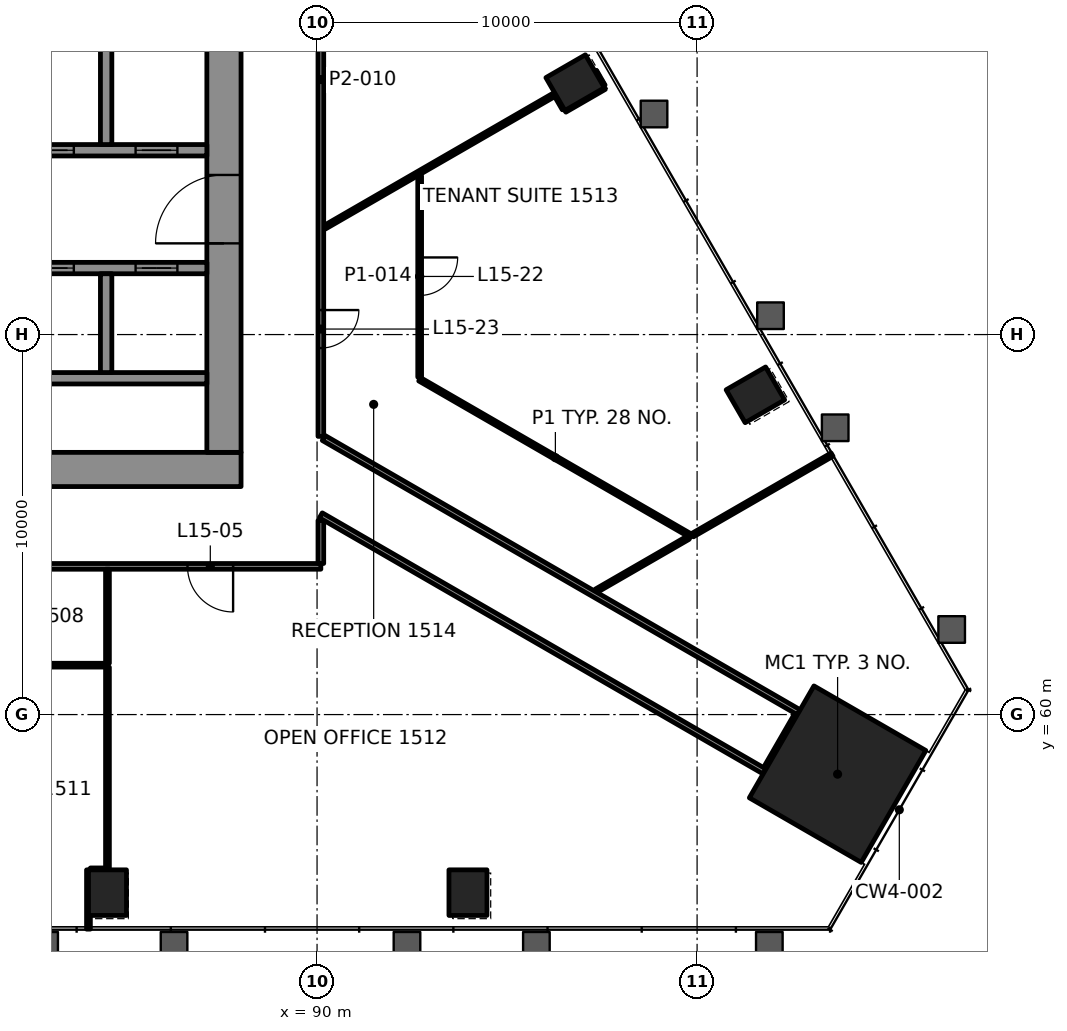
"""IFC4 building model, lengths in metres.
Left out: names, types, materials, properties, quantities, classifications, styles, units other than length and angle.
Written with IfcOpenShell. Run it as: python <this file> out.ifc"""

import sys

from ifc_helpers import new_model, si_unit, direction, frame, frame_2d, origin, origin_2d, place, context, subcontext, project, spatial, rectangle, extrude, element, fill, save


model = new_model("IFC4")
c1 = context("Model", 3, precision=1e-05, world=origin(), true_north=direction((0.0, 1.0)))
c2 = subcontext(c1, "Body", "Model", "MODEL_VIEW")
j1 = project(units=[si_unit("LENGTHUNIT", "METRE"), si_unit("PLANEANGLEUNIT", "RADIAN")], contexts=[c1])
p1 = place(None, origin())
s1 = spatial("IfcSite", under=j1, at=p1, CompositionType="ELEMENT")
p2 = place(p1, origin())
s2 = spatial("IfcBuilding", under=s1, at=p2, CompositionType="ELEMENT")
p3 = place(p2, frame((0.0, 0.0, 69.4)))
s3 = spatial("IfcBuildingStorey", under=s2, at=p3, CompositionType="ELEMENT", Elevation=69.4)
p4 = place(p3, frame((103.697, 58.432, 0.0), z_axis=(0.0, 0.0, 1.0), x_axis=(0.5, 0.866025403784, 0.0)))
e1 = element("IfcColumn", 1, at=p4, inside=s3, PredefinedType="COLUMN", context=c2, shape_type="SweptSolid", body=[
    extrude(rectangle(XDim=3.4, YDim=3.4, at=origin_2d()), origin(), (0.0, 0.0, 1.0), 4.2),
])
for number, where, z_axis, x_axis in (
    (2, (84.485, 55.314, -0.0), (0.0, 0.0, 1.0), (1.0, 0.0, 0.0)),
    (3, (93.971, 55.314, -0.0), (0.0, 0.0, 1.0), (1.0, 0.0, 0.0)),
    (4, (101.534, 68.414, -0.0), (0.0, 0.0, 1.0), (-0.5, 0.866, 0.0)),
    (5, (96.791, 76.628, -0.0), (0.0, 0.0, 1.0), (-0.5, 0.866, 0.0)),
):
    element("IfcColumn", number, at=place(p3, frame(where, z_axis=z_axis, x_axis=x_axis)), inside=s3, PredefinedType="COLUMN", context=c2, shape_type="SweptSolid", body=[
        extrude(rectangle(XDim=1.0, YDim=1.2, at=origin_2d()), origin(), (0.0, 0.0, 1.0), 4.2),
    ])
p5 = place(p3, frame((62.0, 66.45, 0.0), z_axis=(0.0, 0.0, 1.0), x_axis=(1.0, 0.0, 0.0)))
e6 = element("IfcWall", 6, at=p5, inside=s3, PredefinedType="SHEAR", context=c2, shape_type="SweptSolid", body=[
    extrude(rectangle(XDim=26.0, YDim=0.9, at=frame_2d((13.0, 0.0))), origin(), (0.0, 0.0, 1.0), 4.0),
])
p6 = place(p5, frame((3.45, 0.0, 0.0)))
e7 = element("IfcOpeningElement", 7, at=p6, cuts=e6, PredefinedType="OPENING", context=c2, shape_type="SweptSolid", body=[
    extrude(rectangle(XDim=0.9, YDim=2.1, at=frame_2d((0.45, 1.05))), frame((0.0, 0.46, 0.0), z_axis=(0.0, -1.0, 0.0), x_axis=(1.0, 0.0, 0.0)), (0.0, 0.0, 1.0), 0.92),
])
p7 = place(p5, frame((5.637, 0.0, 0.0)))
e8 = element("IfcOpeningElement", 8, at=p7, cuts=e6, PredefinedType="OPENING", context=c2, shape_type="SweptSolid", body=[
    extrude(rectangle(XDim=0.9, YDim=2.1, at=frame_2d((0.45, 1.05))), frame((0.0, 0.46, 0.0), z_axis=(0.0, -1.0, 0.0), x_axis=(1.0, 0.0, 0.0)), (0.0, 0.0, 1.0), 0.92),
])
p8 = place(p5, frame((7.212, 0.0, 0.0)))
e9 = element("IfcOpeningElement", 9, at=p8, cuts=e6, PredefinedType="OPENING", context=c2, shape_type="SweptSolid", body=[
    extrude(rectangle(XDim=0.9, YDim=2.1, at=frame_2d((0.45, 1.05))), frame((0.0, 0.46, 0.0), z_axis=(0.0, -1.0, 0.0), x_axis=(1.0, 0.0, 0.0)), (0.0, 0.0, 1.0), 0.92),
])
p9 = place(p5, frame((8.999, 0.0, 0.0)))
e10 = element("IfcOpeningElement", 10, at=p9, cuts=e6, PredefinedType="OPENING", context=c2, shape_type="SweptSolid", body=[
    extrude(rectangle(XDim=0.9, YDim=2.1, at=frame_2d((0.45, 1.05))), frame((0.0, 0.46, 0.0), z_axis=(0.0, -1.0, 0.0), x_axis=(1.0, 0.0, 0.0)), (0.0, 0.0, 1.0), 0.92),
])
p10 = place(p5, frame((17.324, 0.0, 0.0)))
e11 = element("IfcOpeningElement", 11, at=p10, cuts=e6, PredefinedType="OPENING", context=c2, shape_type="SweptSolid", body=[
    extrude(rectangle(XDim=0.9, YDim=2.1, at=frame_2d((0.45, 1.05))), frame((0.0, 0.46, 0.0), z_axis=(0.0, -1.0, 0.0), x_axis=(1.0, 0.0, 0.0)), (0.0, 0.0, 1.0), 0.92),
])
p11 = place(p3, frame((87.55, 66.9, 0.0), z_axis=(0.0, 0.0, 1.0), x_axis=(0.0, 1.0, 0.0)))
e12 = element("IfcWall", 12, at=p11, inside=s3, PredefinedType="SHEAR", context=c2, shape_type="SweptSolid", body=[
    extrude(rectangle(XDim=16.2, YDim=0.9, at=frame_2d((8.1, 0.0))), origin(), (0.0, 0.0, 1.0), 4.0),
])
p12 = place(p11, frame((5.5, 0.0, 0.0)))
e13 = element("IfcOpeningElement", 13, at=p12, cuts=e12, PredefinedType="OPENING", context=c2, shape_type="SweptSolid", body=[
    extrude(rectangle(XDim=1.8, YDim=2.1, at=frame_2d((0.9, 1.05))), frame((0.0, 0.46, 0.0), z_axis=(0.0, -1.0, 0.0), x_axis=(1.0, 0.0, 0.0)), (0.0, 0.0, 1.0), 0.92),
])
p13 = place(p11, frame((11.202, 0.0, 0.0)))
e14 = element("IfcOpeningElement", 14, at=p13, cuts=e12, PredefinedType="OPENING", context=c2, shape_type="SweptSolid", body=[
    extrude(rectangle(XDim=0.9, YDim=2.1, at=frame_2d((0.45, 1.05))), frame((0.0, 0.46, 0.0), z_axis=(0.0, -1.0, 0.0), x_axis=(1.0, 0.0, 0.0)), (0.0, 0.0, 1.0), 0.92),
])
p14 = place(p3, frame((70.35, 68.85, 0.0), z_axis=(0.0, 0.0, 1.0), x_axis=(1.0, 0.0, 0.0)))
e15 = element("IfcWall", 15, at=p14, inside=s3, PredefinedType="SHEAR", context=c2, shape_type="SweptSolid", body=[
    extrude(rectangle(XDim=16.75, YDim=0.3, at=frame_2d((8.375, 0.0))), origin(), (0.0, 0.0, 1.0), 4.0),
])
p15 = place(p3, frame((70.3, 71.75, 0.0), z_axis=(0.0, 0.0, 1.0), x_axis=(1.0, 0.0, 0.0)))
e16 = element("IfcWall", 16, at=p15, inside=s3, PredefinedType="SHEAR", context=c2, shape_type="SweptSolid", body=[
    extrude(rectangle(XDim=16.8, YDim=0.3, at=frame_2d((8.4, 0.0))), origin(), (0.0, 0.0, 1.0), 4.0),
])
p16 = place(p15, frame((1.0, 0.0, 0.0)))
e17 = element("IfcOpeningElement", 17, at=p16, cuts=e16, PredefinedType="OPENING", context=c2, shape_type="SweptSolid", body=[
    extrude(rectangle(XDim=1.1, YDim=2.1, at=frame_2d((0.55, 1.05))), frame((0.0, 0.16, 0.0), z_axis=(0.0, -1.0, 0.0), x_axis=(1.0, 0.0, 0.0)), (0.0, 0.0, 1.0), 0.32),
])
p17 = place(p15, frame((3.8, 0.0, 0.0)))
e18 = element("IfcOpeningElement", 18, at=p17, cuts=e16, PredefinedType="OPENING", context=c2, shape_type="SweptSolid", body=[
    extrude(rectangle(XDim=1.1, YDim=2.1, at=frame_2d((0.55, 1.05))), frame((0.0, 0.16, 0.0), z_axis=(0.0, -1.0, 0.0), x_axis=(1.0, 0.0, 0.0)), (0.0, 0.0, 1.0), 0.32),
])
p18 = place(p15, frame((6.6, 0.0, 0.0)))
e19 = element("IfcOpeningElement", 19, at=p18, cuts=e16, PredefinedType="OPENING", context=c2, shape_type="SweptSolid", body=[
    extrude(rectangle(XDim=1.1, YDim=2.1, at=frame_2d((0.55, 1.05))), frame((0.0, 0.16, 0.0), z_axis=(0.0, -1.0, 0.0), x_axis=(1.0, 0.0, 0.0)), (0.0, 0.0, 1.0), 0.32),
])
p19 = place(p15, frame((9.4, 0.0, 0.0)))
e20 = element("IfcOpeningElement", 20, at=p19, cuts=e16, PredefinedType="OPENING", context=c2, shape_type="SweptSolid", body=[
    extrude(rectangle(XDim=1.1, YDim=2.1, at=frame_2d((0.55, 1.05))), frame((0.0, 0.16, 0.0), z_axis=(0.0, -1.0, 0.0), x_axis=(1.0, 0.0, 0.0)), (0.0, 0.0, 1.0), 0.32),
])
p20 = place(p15, frame((12.2, 0.0, 0.0)))
e21 = element("IfcOpeningElement", 21, at=p20, cuts=e16, PredefinedType="OPENING", context=c2, shape_type="SweptSolid", body=[
    extrude(rectangle(XDim=1.1, YDim=2.1, at=frame_2d((0.55, 1.05))), frame((0.0, 0.16, 0.0), z_axis=(0.0, -1.0, 0.0), x_axis=(1.0, 0.0, 0.0)), (0.0, 0.0, 1.0), 0.32),
])
p21 = place(p15, frame((14.925, 0.0, 0.0)))
e22 = element("IfcOpeningElement", 22, at=p21, cuts=e16, PredefinedType="OPENING", context=c2, shape_type="SweptSolid", body=[
    extrude(rectangle(XDim=1.1, YDim=2.1, at=frame_2d((0.55, 1.05))), frame((0.0, 0.16, 0.0), z_axis=(0.0, -1.0, 0.0), x_axis=(1.0, 0.0, 0.0)), (0.0, 0.0, 1.0), 0.32),
])
p22 = place(p3, frame((70.3, 74.85, 0.0), z_axis=(0.0, 0.0, 1.0), x_axis=(1.0, 0.0, 0.0)))
e23 = element("IfcWall", 23, at=p22, inside=s3, PredefinedType="SHEAR", context=c2, shape_type="SweptSolid", body=[
    extrude(rectangle(XDim=16.8, YDim=0.3, at=frame_2d((8.4, 0.0))), origin(), (0.0, 0.0, 1.0), 4.0),
])
p23 = place(p22, frame((3.8, 0.0, 0.0)))
e24 = element("IfcOpeningElement", 24, at=p23, cuts=e23, PredefinedType="OPENING", context=c2, shape_type="SweptSolid", body=[
    extrude(rectangle(XDim=1.1, YDim=2.1, at=frame_2d((0.55, 1.05))), frame((0.0, 0.16, 0.0), z_axis=(0.0, -1.0, 0.0), x_axis=(1.0, 0.0, 0.0)), (0.0, 0.0, 1.0), 0.32),
])
p24 = place(p22, frame((12.2, 0.0, 0.0)))
e25 = element("IfcOpeningElement", 25, at=p24, cuts=e23, PredefinedType="OPENING", context=c2, shape_type="SweptSolid", body=[
    extrude(rectangle(XDim=1.1, YDim=2.1, at=frame_2d((0.55, 1.05))), frame((0.0, 0.16, 0.0), z_axis=(0.0, -1.0, 0.0), x_axis=(1.0, 0.0, 0.0)), (0.0, 0.0, 1.0), 0.32),
])
p25 = place(p22, frame((14.925, 0.0, 0.0)))
e26 = element("IfcOpeningElement", 26, at=p25, cuts=e23, PredefinedType="OPENING", context=c2, shape_type="SweptSolid", body=[
    extrude(rectangle(XDim=1.1, YDim=2.1, at=frame_2d((0.55, 1.05))), frame((0.0, 0.16, 0.0), z_axis=(0.0, -1.0, 0.0), x_axis=(1.0, 0.0, 0.0)), (0.0, 0.0, 1.0), 0.32),
])
for number, where, z_axis, x_axis in (
    (27, (84.45, 69.0, 0.0), (0.0, 0.0, 1.0), (0.0, 1.0, 0.0)),
    (28, (84.45, 75.0, 0.0), (0.0, 0.0, 1.0), (0.0, 1.0, 0.0)),
):
    element("IfcWall", number, at=place(p3, frame(where, z_axis=z_axis, x_axis=x_axis)), inside=s3, PredefinedType="SHEAR", context=c2, shape_type="SweptSolid", body=[
        extrude(rectangle(XDim=2.6, YDim=0.3, at=frame_2d((1.3, 0.0))), origin(), (0.0, 0.0, 1.0), 4.0),
    ])
p26 = place(p3, frame((84.036, 55.914, 0.0), z_axis=(0.0, 0.0, 1.0), x_axis=(1.0, 0.0, 0.0)))
e29 = element("IfcWall", 29, at=p26, inside=s3, PredefinedType="PARTITIONING", context=c2, shape_type="SweptSolid", body=[
    extrude(rectangle(XDim=0.399, YDim=0.1, at=frame_2d((0.199, 0.0))), origin(), (0.0, 0.0, 1.0), 3.4),
])
p27 = place(p3, frame((58.271, 61.3, 0.0), z_axis=(0.0, 0.0, 1.0), x_axis=(1.0, 0.0, 0.0)))
e30 = element("IfcWall", 30, at=p27, inside=s3, PredefinedType="PARTITIONING", context=c2, shape_type="SweptSolid", body=[
    extrude(rectangle(XDim=26.214, YDim=0.1, at=frame_2d((13.107, 0.0))), origin(), (0.0, 0.0, 1.0), 3.4),
])
p28 = place(p27, frame((3.122, 0.0, 0.0)))
e31 = element("IfcOpeningElement", 31, at=p28, cuts=e30, PredefinedType="OPENING", context=c2, shape_type="SweptSolid", body=[
    extrude(rectangle(XDim=1.2, YDim=2.1, at=frame_2d((0.6, 1.05))), frame((0.0, 0.06, 0.0), z_axis=(0.0, -1.0, 0.0), x_axis=(1.0, 0.0, 0.0)), (0.0, 0.0, 1.0), 0.12),
])
p29 = place(p27, frame((9.957, 0.0, 0.0)))
e32 = element("IfcOpeningElement", 32, at=p29, cuts=e30, PredefinedType="OPENING", context=c2, shape_type="SweptSolid", body=[
    extrude(rectangle(XDim=0.9, YDim=2.1, at=frame_2d((0.45, 1.05))), frame((0.0, 0.06, 0.0), z_axis=(0.0, -1.0, 0.0), x_axis=(1.0, 0.0, 0.0)), (0.0, 0.0, 1.0), 0.12),
])
p30 = place(p27, frame((16.279, 0.0, 0.0)))
e33 = element("IfcOpeningElement", 33, at=p30, cuts=e30, PredefinedType="OPENING", context=c2, shape_type="SweptSolid", body=[
    extrude(rectangle(XDim=0.9, YDim=2.1, at=frame_2d((0.45, 1.05))), frame((0.0, 0.06, 0.0), z_axis=(0.0, -1.0, 0.0), x_axis=(1.0, 0.0, 0.0)), (0.0, 0.0, 1.0), 0.12),
])
p31 = place(p27, frame((22.501, 0.0, 0.0)))
e34 = element("IfcOpeningElement", 34, at=p31, cuts=e30, PredefinedType="OPENING", context=c2, shape_type="SweptSolid", body=[
    extrude(rectangle(XDim=0.9, YDim=2.1, at=frame_2d((0.45, 1.05))), frame((0.0, 0.06, 0.0), z_axis=(0.0, -1.0, 0.0), x_axis=(1.0, 0.0, 0.0)), (0.0, 0.0, 1.0), 0.12),
])
p32 = place(p3, frame((90.099, 63.9, 0.0), z_axis=(0.0, 0.0, 1.0), x_axis=(-1.0, 0.0, 0.0)))
e35 = element("IfcWall", 35, at=p32, inside=s3, PredefinedType="PARTITIONING", context=c2, shape_type="SweptSolid", body=[
    extrude(rectangle(XDim=30.199, YDim=0.15, at=frame_2d((15.1, 0.0))), origin(), (0.0, 0.0, 1.0), 3.4),
])
p33 = place(p32, frame((2.309, 0.0, 0.0)))
e36 = element("IfcOpeningElement", 36, at=p33, cuts=e35, PredefinedType="OPENING", context=c2, shape_type="SweptSolid", body=[
    extrude(rectangle(XDim=1.2, YDim=2.1, at=frame_2d((0.6, 1.05))), frame((0.0, 0.085, 0.0), z_axis=(0.0, -1.0, 0.0), x_axis=(1.0, 0.0, 0.0)), (0.0, 0.0, 1.0), 0.17),
])
p34 = place(p32, frame((14.599, 0.0, 0.0)))
e37 = element("IfcOpeningElement", 37, at=p34, cuts=e35, PredefinedType="OPENING", context=c2, shape_type="SweptSolid", body=[
    extrude(rectangle(XDim=1.0, YDim=2.1, at=frame_2d((0.5, 1.05))), frame((0.0, 0.085, 0.0), z_axis=(0.0, -1.0, 0.0), x_axis=(1.0, 0.0, 0.0)), (0.0, 0.0, 1.0), 0.17),
])
p35 = place(p32, frame((26.791, 0.0, 0.0)))
e38 = element("IfcOpeningElement", 38, at=p35, cuts=e35, PredefinedType="OPENING", context=c2, shape_type="SweptSolid", body=[
    extrude(rectangle(XDim=1.0, YDim=2.1, at=frame_2d((0.5, 1.05))), frame((0.0, 0.085, 0.0), z_axis=(0.0, -1.0, 0.0), x_axis=(1.0, 0.0, 0.0)), (0.0, 0.0, 1.0), 0.17),
])
p36 = place(p3, frame((97.343, 63.256, 0.0), z_axis=(0.0, 0.0, 1.0), x_axis=(0.866028733576, 0.499994232587, 0.0)))
e39 = element("IfcWall", 39, at=p36, inside=s3, PredefinedType="PARTITIONING", context=c2, shape_type="SweptSolid", body=[
    extrude(rectangle(XDim=2.799, YDim=0.1, at=frame_2d((1.4, 0.0))), origin(), (0.0, 0.0, 1.0), 3.4),
])
p37 = place(p3, frame((96.522, 75.896, 0.0), z_axis=(0.0, 0.0, 1.0), x_axis=(0.865978732077, 0.500080829057, 0.0)))
e40 = element("IfcWall", 40, at=p37, inside=s3, PredefinedType="PARTITIONING", context=c2, shape_type="SweptSolid", body=[
    extrude(rectangle(XDim=1.199, YDim=0.1, at=frame_2d((0.6, 0.0))), origin(), (0.0, 0.0, 1.0), 3.165),
])
p38 = place(p3, frame((90.201, 72.824, 0.0), z_axis=(0.0, 0.0, 1.0), x_axis=(0.866028979627, 0.499993806408, 0.0)))
e41 = element("IfcWall", 41, at=p38, inside=s3, PredefinedType="PARTITIONING", context=c2, shape_type="SweptSolid", body=[
    extrude(rectangle(XDim=7.009, YDim=0.1, at=frame_2d((3.505, 0.0))), origin(), (0.0, 0.0, 1.0), 3.4),
])
p39 = place(p3, frame((101.812, 58.568, 0.0), z_axis=(0.0, 0.0, 1.0), x_axis=(0.499944585209, 0.866057395165, 0.0)))
e42 = element("IfcWall", 42, at=p39, inside=s3, PredefinedType="PARTITIONING", context=c2, shape_type="SweptSolid", body=[
    extrude(rectangle(XDim=1.649, YDim=0.15, at=frame_2d((0.825, 0.0))), origin(), (0.0, 0.0, 1.0), 3.247),
])
p40 = place(p3, frame((92.7, 74.179, 0.0), z_axis=(0.0, 0.0, 1.0), x_axis=(0.0, -1.0, 0.0)))
e43 = element("IfcWall", 43, at=p40, inside=s3, PredefinedType="PARTITIONING", context=c2, shape_type="SweptSolid", body=[
    extrude(rectangle(XDim=5.299, YDim=0.1, at=frame_2d((2.649, 0.0))), origin(), (0.0, 0.0, 1.0), 3.4),
])
p41 = place(p40, frame((2.149, 0.0, 0.0)))
e44 = element("IfcOpeningElement", 44, at=p41, cuts=e43, PredefinedType="OPENING", context=c2, shape_type="SweptSolid", body=[
    extrude(rectangle(XDim=1.0, YDim=2.1, at=frame_2d((0.5, 1.05))), frame((0.0, 0.06, 0.0), z_axis=(0.0, -1.0, 0.0), x_axis=(1.0, 0.0, 0.0)), (0.0, 0.0, 1.0), 0.12),
])
p42 = place(p3, frame((90.1, 63.976, 0.0), z_axis=(0.0, 0.0, 1.0), x_axis=(0.0, 1.0, 0.0)))
e45 = element("IfcWall", 45, at=p42, inside=s3, PredefinedType="PARTITIONING", context=c2, shape_type="SweptSolid", body=[
    extrude(rectangle(XDim=1.131, YDim=0.15, at=frame_2d((0.565, 0.0))), origin(), (0.0, 0.0, 1.0), 3.247),
])
p43 = place(p3, frame((90.1, 86.099, 0.0), z_axis=(0.0, 0.0, 1.0), x_axis=(0.0, -1.0, 0.0)))
e46 = element("IfcWall", 46, at=p43, inside=s3, PredefinedType="PARTITIONING", context=c2, shape_type="SweptSolid", body=[
    extrude(rectangle(XDim=18.778, YDim=0.15, at=frame_2d((9.389, 0.0))), origin(), (0.0, 0.0, 1.0), 3.4),
])
p44 = place(p43, frame((15.455, 0.0, 0.0)))
e47 = element("IfcOpeningElement", 47, at=p44, cuts=e46, PredefinedType="OPENING", context=c2, shape_type="SweptSolid", body=[
    extrude(rectangle(XDim=1.0, YDim=2.1, at=frame_2d((0.5, 1.05))), frame((0.0, 0.085, 0.0), z_axis=(0.0, -1.0, 0.0), x_axis=(1.0, 0.0, 0.0)), (0.0, 0.0, 1.0), 0.17),
])
p45 = place(p3, frame((84.485, 55.915, 0.0), z_axis=(0.0, 0.0, 1.0), x_axis=(0.0, 1.0, 0.0)))
e48 = element("IfcWall", 48, at=p45, inside=s3, PredefinedType="PARTITIONING", context=c2, shape_type="SweptSolid", body=[
    extrude(rectangle(XDim=5.335, YDim=0.1, at=frame_2d((2.668, 0.0))), origin(), (0.0, 0.0, 1.0), 3.4),
])
p46 = place(p3, frame((83.985, 54.354, 0.0), z_axis=(0.0, 0.0, 1.0), x_axis=(0.0, 1.0, 0.0)))
e49 = element("IfcWall", 49, at=p46, inside=s3, PredefinedType="PARTITIONING", context=c2, shape_type="SweptSolid", body=[
    extrude(rectangle(XDim=1.56, YDim=0.1, at=frame_2d((0.78, 0.0))), origin(), (0.0, 0.0, 1.0), 3.165),
])
p47 = place(p3, frame((97.536, 76.539, 0.0), z_axis=(0.0, 0.0, 1.0), x_axis=(-0.499879237999, 0.866095114533, 0.0)))
e50 = element("IfcWall", 50, at=p47, inside=s3, PredefinedType="PARTITIONING", context=c2, shape_type="SweptSolid", body=[
    extrude(rectangle(XDim=0.449, YDim=0.1, at=frame_2d((0.225, 0.0))), origin(), (0.0, 0.0, 1.0), 3.4),
])
p48 = place(p3, frame((96.496, 75.939, 0.0), z_axis=(0.0, 0.0, 1.0), x_axis=(-0.499757756434, 0.866165218006, 0.0)))
e51 = element("IfcWall", 51, at=p48, inside=s3, PredefinedType="PARTITIONING", context=c2, shape_type="SweptSolid", body=[
    extrude(rectangle(XDim=0.399, YDim=0.1, at=frame_2d((0.2, 0.0))), origin(), (0.0, 0.0, 1.0), 3.4),
])
p49 = place(p3, frame((99.842, 64.699, 0.0), z_axis=(0.0, 0.0, 1.0), x_axis=(-0.866022901237, 0.500004334515, 0.0)))
e52 = element("IfcWall", 52, at=p49, inside=s3, PredefinedType="PARTITIONING", context=c2, shape_type="SweptSolid", body=[
    extrude(rectangle(XDim=8.247, YDim=0.1, at=frame_2d((4.124, 0.0))), origin(), (0.0, 0.0, 1.0), 3.4),
])
p50 = place(p3, frame((102.674, 60.062, 0.0), z_axis=(0.0, 0.0, 1.0), x_axis=(-0.866022486604, 0.50000505267, 0.0)))
e53 = element("IfcWall", 53, at=p50, inside=s3, PredefinedType="PARTITIONING", context=c2, shape_type="SweptSolid", body=[
    extrude(rectangle(XDim=14.433, YDim=0.15, at=frame_2d((7.216, 0.0))), origin(), (0.0, 0.0, 1.0), 3.4),
])
p51 = place(p3, frame((101.774, 58.503, 0.0), z_axis=(0.0, 0.0, 1.0), x_axis=(-0.866023326939, 0.500003597184, 0.0)))
e54 = element("IfcWall", 54, at=p51, inside=s3, PredefinedType="PARTITIONING", context=c2, shape_type="SweptSolid", body=[
    extrude(rectangle(XDim=13.48, YDim=0.15, at=frame_2d((6.74, 0.0))), origin(), (0.0, 0.0, 1.0), 3.247),
])
p52 = place(p3, frame((84.485, 61.35, 0.0), z_axis=(0.0, 0.0, 1.0), x_axis=(0.0, 1.0, 0.0)))
e55 = element("IfcWall", 55, at=p52, inside=s3, PredefinedType="PARTITIONING", context=c2, shape_type="SweptSolid", body=[
    extrude(rectangle(XDim=2.475, YDim=0.1, at=frame_2d((1.237, 0.0))), origin(), (0.0, 0.0, 1.0), 3.4),
])
p53 = place(p3, frame((99.879, 64.721, 0.0), z_axis=(0.0, 0.0, 1.0), x_axis=(0.866030225258, 0.499991648869, 0.0)))
e56 = element("IfcWall", 56, at=p53, inside=s3, PredefinedType="PARTITIONING", context=c2, shape_type="SweptSolid", body=[
    extrude(rectangle(XDim=4.239, YDim=0.1, at=frame_2d((2.12, 0.0))), origin(), (0.0, 0.0, 1.0), 3.4),
])
p54 = place(p33, origin())
e57 = element("IfcDoor", 57, at=p54, inside=s3, OperationType="DOUBLE_DOOR_SINGLE_SWING", PredefinedType="DOOR", context=c2, shape_type="SweptSolid", body=[
    extrude(rectangle(XDim=1.2, YDim=2.1, at=frame_2d((0.6, 1.05))), frame((0.0, 0.025, 0.0), z_axis=(0.0, -1.0, 0.0), x_axis=(1.0, 0.0, 0.0)), (0.0, 0.0, 1.0), 0.05),
])
fill(e36, e57)
p55 = place(p41, origin())
e58 = element("IfcDoor", 58, at=p55, inside=s3, OperationType="SINGLE_SWING_LEFT", PredefinedType="DOOR", context=c2, shape_type="SweptSolid", body=[
    extrude(rectangle(XDim=1.0, YDim=2.1, at=frame_2d((0.5, 1.05))), frame((0.0, 0.025, 0.0), z_axis=(0.0, -1.0, 0.0), x_axis=(1.0, 0.0, 0.0)), (0.0, 0.0, 1.0), 0.05),
])
fill(e44, e58)
p56 = place(p44, origin())
e59 = element("IfcDoor", 59, at=p56, inside=s3, OperationType="SINGLE_SWING_RIGHT", PredefinedType="DOOR", context=c2, shape_type="SweptSolid", body=[
    extrude(rectangle(XDim=1.0, YDim=2.1, at=frame_2d((0.5, 1.05))), frame((0.0, 0.025, 0.0), z_axis=(0.0, -1.0, 0.0), x_axis=(1.0, 0.0, 0.0)), (0.0, 0.0, 1.0), 0.05),
])
fill(e47, e59)
p57 = place(p20, origin())
e60 = element("IfcDoor", 60, at=p57, inside=s3, OperationType="DOUBLE_DOOR_SLIDING", PredefinedType="DOOR", context=c2, shape_type="SweptSolid", body=[
    extrude(rectangle(XDim=1.1, YDim=2.1, at=frame_2d((0.55, 1.05))), frame((0.0, 0.025, 0.0), z_axis=(0.0, -1.0, 0.0), x_axis=(1.0, 0.0, 0.0)), (0.0, 0.0, 1.0), 0.05),
])
fill(e21, e60)
p58 = place(p21, origin())
e61 = element("IfcDoor", 61, at=p58, inside=s3, OperationType="DOUBLE_DOOR_SLIDING", PredefinedType="DOOR", context=c2, shape_type="SweptSolid", body=[
    extrude(rectangle(XDim=1.1, YDim=2.1, at=frame_2d((0.55, 1.05))), frame((0.0, 0.025, 0.0), z_axis=(0.0, -1.0, 0.0), x_axis=(1.0, 0.0, 0.0)), (0.0, 0.0, 1.0), 0.05),
])
fill(e22, e61)
p59 = place(p24, origin())
e62 = element("IfcDoor", 62, at=p59, inside=s3, OperationType="DOUBLE_DOOR_SLIDING", PredefinedType="DOOR", context=c2, shape_type="SweptSolid", body=[
    extrude(rectangle(XDim=1.1, YDim=2.1, at=frame_2d((0.55, 1.05))), frame((0.0, 0.025, 0.0), z_axis=(0.0, -1.0, 0.0), x_axis=(1.0, 0.0, 0.0)), (0.0, 0.0, 1.0), 0.05),
])
fill(e25, e62)
p60 = place(p25, origin())
e63 = element("IfcDoor", 63, at=p60, inside=s3, OperationType="DOUBLE_DOOR_SLIDING", PredefinedType="DOOR", context=c2, shape_type="SweptSolid", body=[
    extrude(rectangle(XDim=1.1, YDim=2.1, at=frame_2d((0.55, 1.05))), frame((0.0, 0.025, 0.0), z_axis=(0.0, -1.0, 0.0), x_axis=(1.0, 0.0, 0.0)), (0.0, 0.0, 1.0), 0.05),
])
fill(e26, e63)
p61 = place(p12, origin())
e64 = element("IfcDoor", 64, at=p61, inside=s3, OperationType="SINGLE_SWING_RIGHT", PredefinedType="DOOR", context=c2, shape_type="SweptSolid", body=[
    extrude(rectangle(XDim=1.8, YDim=2.1, at=frame_2d((0.9, 1.05))), frame((0.0, 0.17, 0.0), z_axis=(0.0, -1.0, 0.0), x_axis=(1.0, 0.0, 0.0)), (0.0, 0.0, 1.0), 0.34),
])
fill(e13, e64)
save(model, sys.argv[1])
